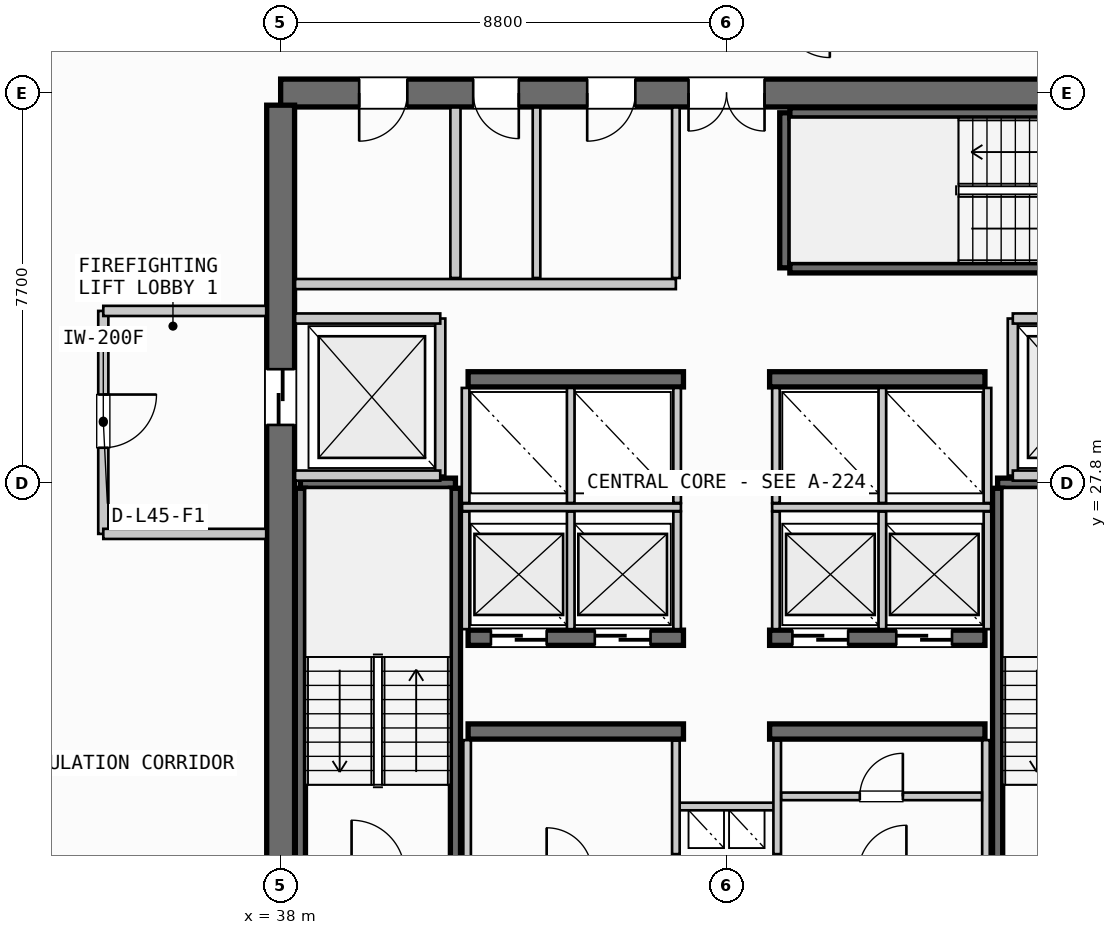
"""IFC4 building model, lengths in metres.
Left out: names, types, materials, properties, quantities, classifications, styles, units other than length and angle.
Written with IfcOpenShell. Run it as: python <this file> out.ifc"""

import sys

from ifc_helpers import new_model, si_unit, direction, frame, frame_2d, origin, place, context, subcontext, project, spatial, rectangle, extrude, source, transform, mapped, element, fill, save


model = new_model("IFC4")
c1 = context("Model", 3, precision=1e-05, world=origin(), true_north=direction((0.0, 1.0)))
c2 = subcontext(c1, "Body", "Model", "MODEL_VIEW")
j1 = project(units=[si_unit("LENGTHUNIT", "METRE"), si_unit("PLANEANGLEUNIT", "RADIAN")], contexts=[c1])
p1 = place(None, origin())
s1 = spatial("IfcSite", under=j1, at=p1, CompositionType="ELEMENT")
p2 = place(p1, origin())
s2 = spatial("IfcBuilding", under=s1, at=p2, CompositionType="ELEMENT")
p3 = place(p2, frame((0.0, 0.0, 176.4)))
s3 = spatial("IfcBuildingStorey", under=s2, at=p3, CompositionType="ELEMENT", Elevation=176.4)
p4 = place(p3, frame((55.6, 35.5, 0.0), z_axis=(0.0, 0.0, 1.0), x_axis=(-1.0, 0.0, 0.0)))
e1 = element("IfcWall", 1, at=p4, inside=s3, PredefinedType="SHEAR", context=c2, shape_type="SweptSolid", body=[
    extrude(rectangle(XDim=17.6, YDim=0.55, at=frame_2d((8.8, 0.0))), origin(), (0.0, 0.0, 1.0), 3.26),
])
p5 = place(p4, frame((8.05, 0.0, 0.0)))
e2 = element("IfcOpeningElement", 2, at=p5, cuts=e1, PredefinedType="OPENING", context=c2, shape_type="SweptSolid", body=[
    extrude(rectangle(XDim=1.5, YDim=2.2, at=frame_2d((0.75, 1.1))), frame((0.0, 0.285, 0.0), z_axis=(0.0, -1.0, 0.0), x_axis=(1.0, 0.0, 0.0)), (0.0, 0.0, 1.0), 0.57),
])
p6 = place(p4, frame((15.1, 0.0, 0.0)))
e3 = element("IfcOpeningElement", 3, at=p6, cuts=e1, PredefinedType="OPENING", context=c2, shape_type="SweptSolid", body=[
    extrude(rectangle(XDim=0.95, YDim=2.15, at=frame_2d((0.475, 1.075))), frame((0.0, 0.285, 0.0), z_axis=(0.0, -1.0, 0.0), x_axis=(1.0, 0.0, 0.0)), (0.0, 0.0, 1.0), 0.57),
])
p7 = place(p4, frame((12.9, 0.0, 0.0)))
e4 = element("IfcOpeningElement", 4, at=p7, cuts=e1, PredefinedType="OPENING", context=c2, shape_type="SweptSolid", body=[
    extrude(rectangle(XDim=0.9, YDim=2.15, at=frame_2d((0.45, 1.075))), frame((0.0, 0.285, 0.0), z_axis=(0.0, -1.0, 0.0), x_axis=(1.0, 0.0, 0.0)), (0.0, 0.0, 1.0), 0.57),
])
p8 = place(p4, frame((10.6, 0.0, 0.0)))
e5 = element("IfcOpeningElement", 5, at=p8, cuts=e1, PredefinedType="OPENING", context=c2, shape_type="SweptSolid", body=[
    extrude(rectangle(XDim=0.95, YDim=2.15, at=frame_2d((0.475, 1.075))), frame((0.0, 0.285, 0.0), z_axis=(0.0, -1.0, 0.0), x_axis=(1.0, 0.0, 0.0)), (0.0, 0.0, 1.0), 0.57),
])
p9 = place(p3, frame((38.0, 35.26, 0.0), z_axis=(0.0, 0.0, 1.0), x_axis=(0.0, -1.0, 0.0)))
e6 = element("IfcWall", 6, at=p9, inside=s3, PredefinedType="SHEAR", context=c2, shape_type="SweptSolid", body=[
    extrude(rectangle(XDim=14.92, YDim=0.55, at=frame_2d((7.46, 0.0))), origin(), (0.0, 0.0, 1.0), 3.26),
])
p10 = place(p9, frame((5.21, 0.0, 0.0)))
e7 = element("IfcOpeningElement", 7, at=p10, cuts=e6, PredefinedType="OPENING", context=c2, shape_type="SweptSolid", body=[
    extrude(rectangle(XDim=1.1, YDim=2.2, at=frame_2d((0.55, 1.1))), frame((0.0, 0.285, 0.0), z_axis=(0.0, -1.0, 0.0), x_axis=(1.0, 0.0, 0.0)), (0.0, 0.0, 1.0), 0.57),
])
for number, where, z_axis, x_axis in (
    (8, (41.7, 22.9, 0.0), (0.0, 0.0, 1.0), (1.0, 0.0, 0.0)),
    (9, (47.65, 22.9, 0.0), (0.0, 0.0, 1.0), (1.0, 0.0, 0.0)),
):
    element("IfcWall", number, at=place(p3, frame(where, z_axis=z_axis, x_axis=x_axis)), inside=s3, PredefinedType="SHEAR", context=c2, shape_type="SweptSolid", body=[
        extrude(rectangle(XDim=4.25, YDim=0.3, at=frame_2d((2.125, 0.0))), origin(), (0.0, 0.0, 1.0), 3.26),
    ])
p11 = place(p3, frame((41.7, 24.75, 0.0), z_axis=(0.0, 0.0, 1.0), x_axis=(1.0, 0.0, 0.0)))
e10 = element("IfcWall", 10, at=p11, inside=s3, PredefinedType="SHEAR", context=c2, shape_type="SweptSolid", body=[
    extrude(rectangle(XDim=4.25, YDim=0.3, at=frame_2d((2.125, 0.0))), origin(), (0.0, 0.0, 1.0), 3.26),
])
p12 = place(p11, frame((0.45, 0.0, 0.0)))
e11 = element("IfcOpeningElement", 11, at=p12, cuts=e10, PredefinedType="OPENING", context=c2, shape_type="SweptSolid", body=[
    extrude(rectangle(XDim=1.1, YDim=2.2, at=frame_2d((0.55, 1.1))), frame((0.0, 0.16, 0.0), z_axis=(0.0, -1.0, 0.0), x_axis=(1.0, 0.0, 0.0)), (0.0, 0.0, 1.0), 0.32),
])
p13 = place(p11, frame((2.5, 0.0, 0.0)))
e12 = element("IfcOpeningElement", 12, at=p13, cuts=e10, PredefinedType="OPENING", context=c2, shape_type="SweptSolid", body=[
    extrude(rectangle(XDim=1.1, YDim=2.2, at=frame_2d((0.55, 1.1))), frame((0.0, 0.16, 0.0), z_axis=(0.0, -1.0, 0.0), x_axis=(1.0, 0.0, 0.0)), (0.0, 0.0, 1.0), 0.32),
])
p14 = place(p3, frame((47.65, 24.75, 0.0), z_axis=(0.0, 0.0, 1.0), x_axis=(1.0, 0.0, 0.0)))
e13 = element("IfcWall", 13, at=p14, inside=s3, PredefinedType="SHEAR", context=c2, shape_type="SweptSolid", body=[
    extrude(rectangle(XDim=4.25, YDim=0.3, at=frame_2d((2.125, 0.0))), origin(), (0.0, 0.0, 1.0), 3.26),
])
p15 = place(p14, frame((0.45, 0.0, 0.0)))
e14 = element("IfcOpeningElement", 14, at=p15, cuts=e13, PredefinedType="OPENING", context=c2, shape_type="SweptSolid", body=[
    extrude(rectangle(XDim=1.1, YDim=2.2, at=frame_2d((0.55, 1.1))), frame((0.0, 0.16, 0.0), z_axis=(0.0, -1.0, 0.0), x_axis=(1.0, 0.0, 0.0)), (0.0, 0.0, 1.0), 0.32),
])
p16 = place(p14, frame((2.5, 0.0, 0.0)))
e15 = element("IfcOpeningElement", 15, at=p16, cuts=e13, PredefinedType="OPENING", context=c2, shape_type="SweptSolid", body=[
    extrude(rectangle(XDim=1.1, YDim=2.2, at=frame_2d((0.55, 1.1))), frame((0.0, 0.16, 0.0), z_axis=(0.0, -1.0, 0.0), x_axis=(1.0, 0.0, 0.0)), (0.0, 0.0, 1.0), 0.32),
])
for number, where, z_axis, x_axis in (
    (16, (41.7, 29.85, 0.0), (0.0, 0.0, 1.0), (1.0, 0.0, 0.0)),
    (17, (47.65, 29.85, 0.0), (0.0, 0.0, 1.0), (1.0, 0.0, 0.0)),
):
    element("IfcWall", number, at=place(p3, frame(where, z_axis=z_axis, x_axis=x_axis)), inside=s3, PredefinedType="SHEAR", context=c2, shape_type="SweptSolid", body=[
        extrude(rectangle(XDim=4.25, YDim=0.3, at=frame_2d((2.125, 0.0))), origin(), (0.0, 0.0, 1.0), 3.26),
    ])
p17 = place(p3, frame((38.39, 27.8, 0.0), z_axis=(0.0, 0.0, 1.0), x_axis=(1.0, 0.0, 0.0)))
e18 = element("IfcWall", 18, at=p17, inside=s3, PredefinedType="SHEAR", context=c2, shape_type="SweptSolid", body=[
    extrude(rectangle(XDim=3.06, YDim=0.2, at=frame_2d((1.53, 0.0))), origin(), (0.0, 0.0, 1.0), 3.26),
])
for number, where, z_axis, x_axis in (
    (19, (41.45, 27.7, 0.0), (0.0, 0.0, 1.0), (0.0, -1.0, 0.0)),
    (20, (38.39, 20.35, 0.0), (0.0, 0.0, 1.0), (0.0, 1.0, 0.0)),
):
    element("IfcWall", number, at=place(p3, frame(where, z_axis=z_axis, x_axis=x_axis)), inside=s3, PredefinedType="SHEAR", context=c2, shape_type="SweptSolid", body=[
        extrude(rectangle(XDim=7.35, YDim=0.2, at=frame_2d((3.675, 0.0))), origin(), (0.0, 0.0, 1.0), 3.26),
    ])
p18 = place(p3, frame((52.15, 27.8, 0.0), z_axis=(0.0, 0.0, 1.0), x_axis=(1.0, 0.0, 0.0)))
e21 = element("IfcWall", 21, at=p18, inside=s3, PredefinedType="SHEAR", context=c2, shape_type="SweptSolid", body=[
    extrude(rectangle(XDim=3.06, YDim=0.2, at=frame_2d((1.53, 0.0))), origin(), (0.0, 0.0, 1.0), 3.26),
])
p19 = place(p3, frame((52.15, 20.35, 0.0), z_axis=(0.0, 0.0, 1.0), x_axis=(0.0, 1.0, 0.0)))
e22 = element("IfcWall", 22, at=p19, inside=s3, PredefinedType="SHEAR", context=c2, shape_type="SweptSolid", body=[
    extrude(rectangle(XDim=7.35, YDim=0.2, at=frame_2d((3.675, 0.0))), origin(), (0.0, 0.0, 1.0), 3.26),
])
p20 = place(p3, frame((47.95, 32.05, 0.0), z_axis=(0.0, 0.0, 1.0), x_axis=(0.0, 1.0, 0.0)))
e23 = element("IfcWall", 23, at=p20, inside=s3, PredefinedType="SHEAR", context=c2, shape_type="SweptSolid", body=[
    extrude(rectangle(XDim=3.06, YDim=0.2, at=frame_2d((1.53, 0.0))), origin(), (0.0, 0.0, 1.0), 3.26),
])
for number, where, z_axis, x_axis in (
    (24, (48.05, 35.11, 0.0), (0.0, 0.0, 1.0), (1.0, 0.0, 0.0)),
    (25, (55.4, 32.05, 0.0), (0.0, 0.0, 1.0), (-1.0, 0.0, 0.0)),
):
    element("IfcWall", number, at=place(p3, frame(where, z_axis=z_axis, x_axis=x_axis)), inside=s3, PredefinedType="SHEAR", context=c2, shape_type="SweptSolid", body=[
        extrude(rectangle(XDim=7.35, YDim=0.2, at=frame_2d((3.675, 0.0))), origin(), (0.0, 0.0, 1.0), 3.26),
    ])
p21 = place(p3, frame((45.8, 21.42, 0.0), z_axis=(0.0, 0.0, 1.0), x_axis=(1.0, 0.0, 0.0)))
e26 = element("IfcWall", 26, at=p21, inside=s3, PredefinedType="PARTITIONING", context=c2, shape_type="SweptSolid", body=[
    extrude(rectangle(XDim=2.0, YDim=0.15, at=frame_2d((1.0, 0.0))), origin(), (0.0, 0.0, 1.0), 2.28),
])
for number, where, z_axis, x_axis in (
    (27, (45.8, 20.48, 0.0), (0.0, 0.0, 1.0), (0.0, 1.0, 0.0)),
    (28, (47.8, 20.48, 0.0), (0.0, 0.0, 1.0), (0.0, 1.0, 0.0)),
):
    element("IfcWall", number, at=place(p3, frame(where, z_axis=z_axis, x_axis=x_axis)), inside=s3, PredefinedType="PARTITIONING", context=c2, shape_type="SweptSolid", body=[
        extrude(rectangle(XDim=2.24, YDim=0.15, at=frame_2d((1.12, 0.0))), origin(), (0.0, 0.0, 1.0), 2.28),
    ])
p22 = place(p3, frame((41.15, 27.95, 0.0), z_axis=(0.0, 0.0, 1.0), x_axis=(0.0, 1.0, 0.0)))
e29 = element("IfcWall", 29, at=p22, inside=s3, PredefinedType="PARTITIONING", context=c2, shape_type="SweptSolid", body=[
    extrude(rectangle(XDim=3.1, YDim=0.2, at=frame_2d((1.55, 0.0))), origin(), (0.0, 0.0, 1.0), 2.28),
])
for number, where, z_axis, x_axis in (
    (30, (38.285, 27.95, 0.0), (0.0, 0.0, 1.0), (1.0, 0.0, 0.0)),
    (31, (38.285, 31.05, 0.0), (0.0, 0.0, 1.0), (1.0, 0.0, 0.0)),
):
    element("IfcWall", number, at=place(p3, frame(where, z_axis=z_axis, x_axis=x_axis)), inside=s3, PredefinedType="PARTITIONING", context=c2, shape_type="SweptSolid", body=[
        extrude(rectangle(XDim=2.865, YDim=0.2, at=frame_2d((1.433, 0.0))), origin(), (0.0, 0.0, 1.0), 2.28),
    ])
p23 = place(p3, frame((34.5, 31.2, 0.0), z_axis=(0.0, 0.0, 1.0), x_axis=(0.0, -1.0, 0.0)))
e32 = element("IfcWall", 32, at=p23, inside=s3, PredefinedType="PARTITIONING", context=c2, shape_type="SweptSolid", body=[
    extrude(rectangle(XDim=4.4, YDim=0.2, at=frame_2d((2.2, 0.0))), origin(), (0.0, 0.0, 1.0), 2.28),
])
p24 = place(p23, frame((1.65, 0.0, 0.0)))
e33 = element("IfcOpeningElement", 33, at=p24, cuts=e32, PredefinedType="OPENING", context=c2, shape_type="SweptSolid", body=[
    extrude(rectangle(XDim=1.05, YDim=2.15, at=frame_2d((0.525, 1.075))), frame((0.0, 0.11, 0.0), z_axis=(0.0, -1.0, 0.0), x_axis=(1.0, 0.0, 0.0)), (0.0, 0.0, 1.0), 0.22),
])
for number, where, z_axis, x_axis in (
    (34, (34.5, 26.8, 0.0), (0.0, 0.0, 1.0), (1.0, 0.0, 0.0)),
    (35, (34.5, 31.2, 0.0), (0.0, 0.0, 1.0), (1.0, 0.0, 0.0)),
):
    element("IfcWall", number, at=place(p3, frame(where, z_axis=z_axis, x_axis=x_axis)), inside=s3, PredefinedType="PARTITIONING", context=c2, shape_type="SweptSolid", body=[
        extrude(rectangle(XDim=3.215, YDim=0.2, at=frame_2d((1.607, 0.0))), origin(), (0.0, 0.0, 1.0), 2.28),
    ])
p25 = place(p3, frame((52.45, 27.95, 0.0), z_axis=(0.0, 0.0, 1.0), x_axis=(0.0, 1.0, 0.0)))
e36 = element("IfcWall", 36, at=p25, inside=s3, PredefinedType="PARTITIONING", context=c2, shape_type="SweptSolid", body=[
    extrude(rectangle(XDim=3.1, YDim=0.2, at=frame_2d((1.55, 0.0))), origin(), (0.0, 0.0, 1.0), 2.28),
])
for number, where, z_axis, x_axis in (
    (37, (52.45, 27.95, 0.0), (0.0, 0.0, 1.0), (1.0, 0.0, 0.0)),
    (38, (52.45, 31.05, 0.0), (0.0, 0.0, 1.0), (1.0, 0.0, 0.0)),
):
    element("IfcWall", number, at=place(p3, frame(where, z_axis=z_axis, x_axis=x_axis)), inside=s3, PredefinedType="PARTITIONING", context=c2, shape_type="SweptSolid", body=[
        extrude(rectangle(XDim=2.865, YDim=0.2, at=frame_2d((1.433, 0.0))), origin(), (0.0, 0.0, 1.0), 2.28),
    ])
for number, where, z_axis, x_axis in (
    (39, (41.68, 20.385, 0.0), (0.0, 0.0, 1.0), (0.0, 1.0, 0.0)),
    (40, (51.92, 20.385, 0.0), (0.0, 0.0, 1.0), (0.0, 1.0, 0.0)),
):
    element("IfcWall", number, at=place(p3, frame(where, z_axis=z_axis, x_axis=x_axis)), inside=s3, PredefinedType="PARTITIONING", context=c2, shape_type="SweptSolid", body=[
        extrude(rectangle(XDim=2.345, YDim=0.15, at=frame_2d((1.172, 0.0))), origin(), (0.0, 0.0, 1.0), 2.28),
    ])
p26 = place(p3, frame((47.88, 21.62, 0.0), z_axis=(0.0, 0.0, 1.0), x_axis=(1.0, 0.0, 0.0)))
e41 = element("IfcWall", 41, at=p26, inside=s3, PredefinedType="PARTITIONING", context=c2, shape_type="SweptSolid", body=[
    extrude(rectangle(XDim=3.96, YDim=0.15, at=frame_2d((1.98, 0.0))), origin(), (0.0, 0.0, 1.0), 2.28),
])
p27 = place(p26, frame((1.55, 0.0, 0.0)))
e42 = element("IfcOpeningElement", 42, at=p27, cuts=e41, PredefinedType="OPENING", context=c2, shape_type="SweptSolid", body=[
    extrude(rectangle(XDim=0.85, YDim=2.15, at=frame_2d((0.425, 1.075))), frame((0.0, 0.085, 0.0), z_axis=(0.0, -1.0, 0.0), x_axis=(1.0, 0.0, 0.0)), (0.0, 0.0, 1.0), 0.17),
])
p28 = place(p3, frame((41.58, 27.325, 0.0), z_axis=(0.0, 0.0, 1.0), x_axis=(1.0, 0.0, 0.0)))
e43 = element("IfcWall", 43, at=p28, inside=s3, PredefinedType="PARTITIONING", context=c2, shape_type="SweptSolid", body=[
    extrude(rectangle(XDim=4.32, YDim=0.15, at=frame_2d((2.16, 0.0))), origin(), (0.0, 0.0, 1.0), 2.28),
])
p29 = place(p3, frame((47.7, 27.325, 0.0), z_axis=(0.0, 0.0, 1.0), x_axis=(1.0, 0.0, 0.0)))
e44 = element("IfcWall", 44, at=p29, inside=s3, PredefinedType="PARTITIONING", context=c2, shape_type="SweptSolid", body=[
    extrude(rectangle(XDim=4.32, YDim=0.15, at=frame_2d((2.16, 0.0))), origin(), (0.0, 0.0, 1.0), 2.28),
])
for number, where, z_axis, x_axis in (
    (45, (41.65, 24.92, 0.0), (0.0, 0.0, 1.0), (0.0, 1.0, 0.0)),
    (46, (43.725, 24.92, 0.0), (0.0, 0.0, 1.0), (0.0, 1.0, 0.0)),
    (47, (45.825, 24.92, 0.0), (0.0, 0.0, 1.0), (0.0, 1.0, 0.0)),
    (48, (47.775, 24.92, 0.0), (0.0, 0.0, 1.0), (0.0, 1.0, 0.0)),
    (49, (49.875, 24.92, 0.0), (0.0, 0.0, 1.0), (0.0, 1.0, 0.0)),
    (50, (51.95, 24.92, 0.0), (0.0, 0.0, 1.0), (0.0, 1.0, 0.0)),
):
    element("IfcWall", number, at=place(p3, frame(where, z_axis=z_axis, x_axis=x_axis)), inside=s3, PredefinedType="PARTITIONING", context=c2, shape_type="SweptSolid", body=[
        extrude(rectangle(XDim=2.32, YDim=0.15, at=frame_2d((1.16, 0.0))), origin(), (0.0, 0.0, 1.0), 2.28),
    ])
for number, where, z_axis, x_axis in (
    (51, (41.65, 27.41, 0.0), (0.0, 0.0, 1.0), (0.0, 1.0, 0.0)),
    (52, (43.725, 27.41, 0.0), (0.0, 0.0, 1.0), (0.0, 1.0, 0.0)),
    (53, (45.825, 27.41, 0.0), (0.0, 0.0, 1.0), (0.0, 1.0, 0.0)),
    (54, (47.775, 27.41, 0.0), (0.0, 0.0, 1.0), (0.0, 1.0, 0.0)),
    (55, (49.875, 27.41, 0.0), (0.0, 0.0, 1.0), (0.0, 1.0, 0.0)),
    (56, (51.95, 27.41, 0.0), (0.0, 0.0, 1.0), (0.0, 1.0, 0.0)),
):
    element("IfcWall", number, at=place(p3, frame(where, z_axis=z_axis, x_axis=x_axis)), inside=s3, PredefinedType="PARTITIONING", context=c2, shape_type="SweptSolid", body=[
        extrude(rectangle(XDim=2.27, YDim=0.15, at=frame_2d((1.135, 0.0))), origin(), (0.0, 0.0, 1.0), 2.28),
    ])
p30 = place(p3, frame((41.45, 31.85, 0.0), z_axis=(0.0, 0.0, 1.0), x_axis=(0.0, 1.0, 0.0)))
e57 = element("IfcWall", 57, at=p30, inside=s3, PredefinedType="PARTITIONING", context=c2, shape_type="SweptSolid", body=[
    extrude(rectangle(XDim=3.365, YDim=0.2, at=frame_2d((1.683, 0.0))), origin(), (0.0, 0.0, 1.0), 2.28),
])
p31 = place(p3, frame((38.285, 31.73, 0.0), z_axis=(0.0, 0.0, 1.0), x_axis=(1.0, 0.0, 0.0)))
e58 = element("IfcWall", 58, at=p31, inside=s3, PredefinedType="PARTITIONING", context=c2, shape_type="SweptSolid", body=[
    extrude(rectangle(XDim=7.515, YDim=0.2, at=frame_2d((3.758, 0.0))), origin(), (0.0, 0.0, 1.0), 2.28),
])
p32 = place(p3, frame((45.8, 31.85, 0.0), z_axis=(0.0, 0.0, 1.0), x_axis=(0.0, 1.0, 0.0)))
e59 = element("IfcWall", 59, at=p32, inside=s3, PredefinedType="PARTITIONING", context=c2, shape_type="SweptSolid", body=[
    extrude(rectangle(XDim=3.365, YDim=0.15, at=frame_2d((1.683, 0.0))), origin(), (0.0, 0.0, 1.0), 2.28),
])
p33 = place(p3, frame((43.05, 31.85, 0.0), z_axis=(0.0, 0.0, 1.0), x_axis=(0.0, 1.0, 0.0)))
e60 = element("IfcWall", 60, at=p33, inside=s3, PredefinedType="PLUMBINGWALL", context=c2, shape_type="SweptSolid", body=[
    extrude(rectangle(XDim=3.365, YDim=0.15, at=frame_2d((1.683, 0.0))), origin(), (0.0, 0.0, 1.0), 2.28),
])
m1 = source(origin(), c2, "Body", "SweptSolid", [
    extrude(rectangle(XDim=1.5, YDim=2.2, at=frame_2d((0.75, 1.1))), frame((0.0, 0.025, 0.0), z_axis=(0.0, -1.0, 0.0), x_axis=(1.0, 0.0, 0.0)), (0.0, 0.0, 1.0), 0.05),
])
p34 = place(p5, origin())
e61 = element("IfcDoor", 61, at=p34, inside=s3, OperationType="DOUBLE_DOOR_SINGLE_SWING", PredefinedType="DOOR", context=c2, shape_type="MappedRepresentation", body=[
    mapped(m1, transform((0.0, 0.0, 0.0), scale=1.0)),
])
fill(e2, e61)
m2 = source(origin(), c2, "Body", "SweptSolid", [
    extrude(rectangle(XDim=1.1, YDim=2.2, at=frame_2d((0.55, 1.1))), frame((0.0, 0.025, 0.0), z_axis=(0.0, -1.0, 0.0), x_axis=(1.0, 0.0, 0.0)), (0.0, 0.0, 1.0), 0.05),
])
p35 = place(p10, origin())
e62 = element("IfcDoor", 62, at=p35, inside=s3, OperationType="SLIDING_TO_LEFT", PredefinedType="DOOR", context=c2, shape_type="MappedRepresentation", body=[
    mapped(m2, transform((0.0, 0.0, 0.0), scale=1.0)),
])
fill(e7, e62)
p36 = place(p12, origin())
e63 = element("IfcDoor", 63, at=p36, inside=s3, OperationType="SLIDING_TO_RIGHT", PredefinedType="DOOR", context=c2, shape_type="MappedRepresentation", body=[
    mapped(m2, transform((0.0, 0.0, 0.0), scale=1.0)),
])
fill(e11, e63)
p37 = place(p13, origin())
e64 = element("IfcDoor", 64, at=p37, inside=s3, OperationType="SLIDING_TO_RIGHT", PredefinedType="DOOR", context=c2, shape_type="MappedRepresentation", body=[
    mapped(m2, transform((0.0, 0.0, 0.0), scale=1.0)),
])
fill(e12, e64)
p38 = place(p15, origin())
e65 = element("IfcDoor", 65, at=p38, inside=s3, OperationType="SLIDING_TO_RIGHT", PredefinedType="DOOR", context=c2, shape_type="MappedRepresentation", body=[
    mapped(m2, transform((0.0, 0.0, 0.0), scale=1.0)),
])
fill(e14, e65)
p39 = place(p16, origin())
e66 = element("IfcDoor", 66, at=p39, inside=s3, OperationType="SLIDING_TO_RIGHT", PredefinedType="DOOR", context=c2, shape_type="MappedRepresentation", body=[
    mapped(m2, transform((0.0, 0.0, 0.0), scale=1.0)),
])
fill(e15, e66)
m3 = source(origin(), c2, "Body", "SweptSolid", [
    extrude(rectangle(XDim=0.95, YDim=2.15, at=frame_2d((0.475, 1.075))), frame((0.0, 0.025, 0.0), z_axis=(0.0, -1.0, 0.0), x_axis=(1.0, 0.0, 0.0)), (0.0, 0.0, 1.0), 0.05),
])
p40 = place(p6, origin())
e67 = element("IfcDoor", 67, at=p40, inside=s3, OperationType="SINGLE_SWING_RIGHT", PredefinedType="DOOR", context=c2, shape_type="MappedRepresentation", body=[
    mapped(m3, transform((0.0, 0.0, 0.0), scale=1.0)),
])
fill(e3, e67)
m4 = source(origin(), c2, "Body", "SweptSolid", [
    extrude(rectangle(XDim=0.9, YDim=2.15, at=frame_2d((0.45, 1.075))), frame((0.0, 0.025, 0.0), z_axis=(0.0, -1.0, 0.0), x_axis=(1.0, 0.0, 0.0)), (0.0, 0.0, 1.0), 0.05),
])
p41 = place(p7, origin())
e68 = element("IfcDoor", 68, at=p41, inside=s3, OperationType="SINGLE_SWING_LEFT", PredefinedType="DOOR", context=c2, shape_type="MappedRepresentation", body=[
    mapped(m4, transform((0.0, 0.0, 0.0), scale=1.0)),
])
fill(e4, e68)
p42 = place(p8, origin())
e69 = element("IfcDoor", 69, at=p42, inside=s3, OperationType="SINGLE_SWING_RIGHT", PredefinedType="DOOR", context=c2, shape_type="MappedRepresentation", body=[
    mapped(m3, transform((0.0, 0.0, 0.0), scale=1.0)),
])
fill(e5, e69)
m5 = source(origin(), c2, "Body", "SweptSolid", [
    extrude(rectangle(XDim=1.05, YDim=2.15, at=frame_2d((0.525, 1.075))), frame((0.0, 0.025, 0.0), z_axis=(0.0, -1.0, 0.0), x_axis=(1.0, 0.0, 0.0)), (0.0, 0.0, 1.0), 0.05),
])
p43 = place(p24, origin())
e70 = element("IfcDoor", 70, at=p43, inside=s3, OperationType="SINGLE_SWING_LEFT", PredefinedType="DOOR", context=c2, shape_type="MappedRepresentation", body=[
    mapped(m5, transform((0.0, 0.0, 0.0), scale=1.0)),
])
fill(e33, e70)
m6 = source(origin(), c2, "Body", "SweptSolid", [
    extrude(rectangle(XDim=0.85, YDim=2.15, at=frame_2d((0.425, 1.075))), frame((0.0, 0.025, 0.0), z_axis=(0.0, -1.0, 0.0), x_axis=(1.0, 0.0, 0.0)), (0.0, 0.0, 1.0), 0.05),
])
p44 = place(p27, origin())
e71 = element("IfcDoor", 71, at=p44, inside=s3, OperationType="SINGLE_SWING_RIGHT", PredefinedType="DOOR", context=c2, shape_type="MappedRepresentation", body=[
    mapped(m6, transform((0.0, 0.0, 0.0), scale=1.0)),
])
fill(e42, e71)
save(model, sys.argv[1])
